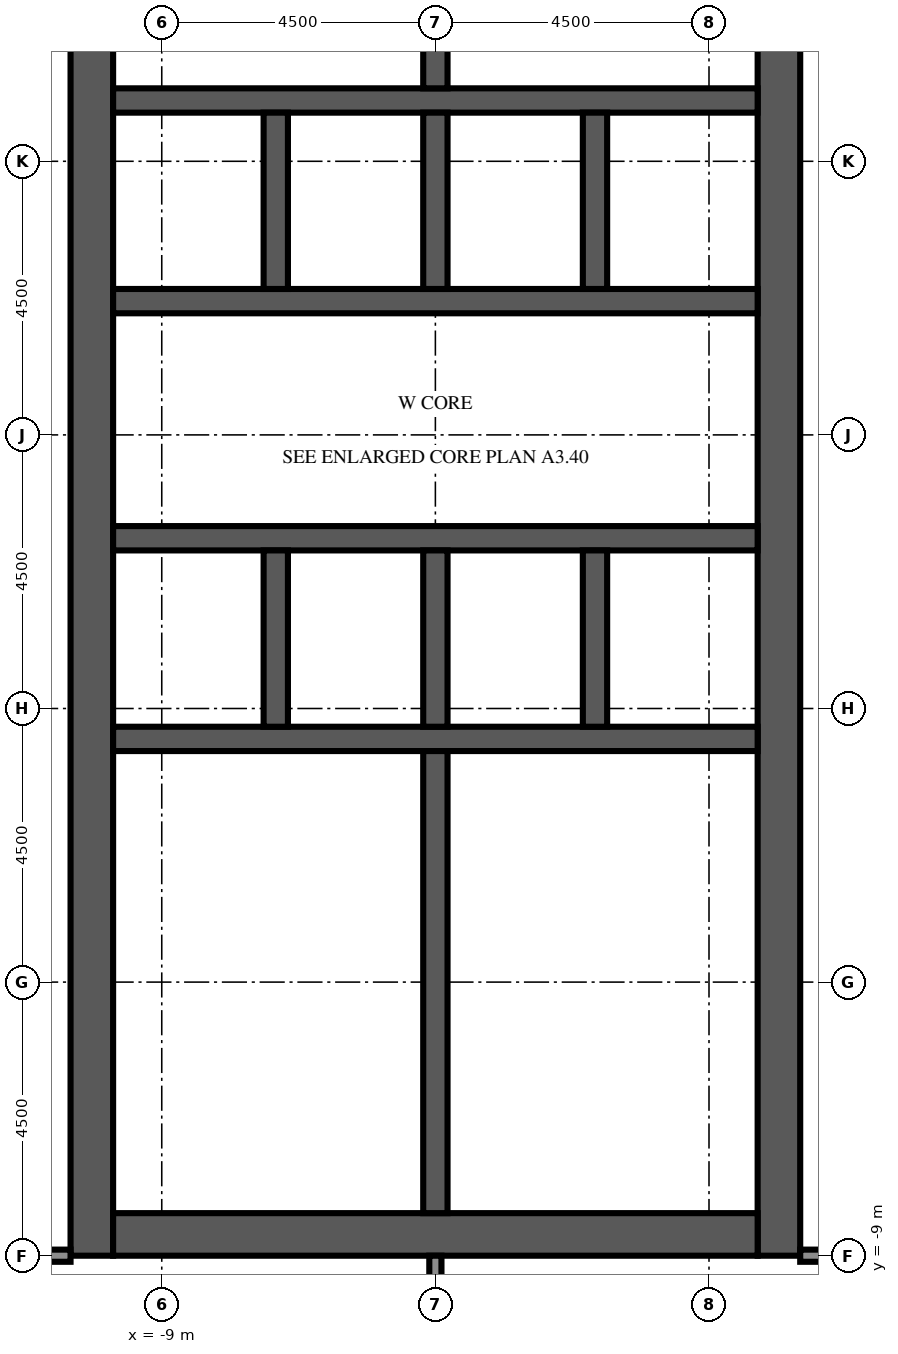
"""IFC4 building model, lengths in metres.
Left out: names, types, materials, properties, quantities, classifications, styles, units other than length and angle.
Written with IfcOpenShell. Run it as: python <this file> out.ifc"""

import sys

from ifc_helpers import new_model, si_unit, direction, frame, frame_2d, origin, place, context, subcontext, project, spatial, rectangle, extrude, element, fill, save


model = new_model("IFC4")
c1 = context("Model", 3, precision=1e-05, world=origin(), true_north=direction((0.0, 1.0)))
c2 = subcontext(c1, "Body", "Model", "MODEL_VIEW")
j1 = project(units=[si_unit("LENGTHUNIT", "METRE"), si_unit("PLANEANGLEUNIT", "RADIAN")], contexts=[c1])
p1 = place(None, origin())
s1 = spatial("IfcSite", under=j1, at=p1, CompositionType="ELEMENT")
p2 = place(p1, origin())
s2 = spatial("IfcBuilding", under=s1, at=p2, CompositionType="ELEMENT")
p3 = place(p2, frame((0.0, 0.0, 274.5)))
s3 = spatial("IfcBuildingStorey", under=s2, at=p3, CompositionType="ELEMENT", Elevation=274.5)
p4 = place(p3, frame((-10.15, -9.0, 0.0), z_axis=(0.0, 0.0, 1.0), x_axis=(0.0, 1.0, 0.0)))
e1 = element("IfcWall", 1, at=p4, inside=s3, PredefinedType="SHEAR", context=c2, shape_type="SweptSolid", body=[
    extrude(rectangle(XDim=27.5, YDim=0.7, at=frame_2d((13.75, 0.0))), origin(), (0.0, 0.0, 1.0), 4.1),
])
p5 = place(p4, frame((12.55, 0.0, 0.0)))
e2 = element("IfcOpeningElement", 2, at=p5, cuts=e1, PredefinedType="OPENING", context=c2, shape_type="SweptSolid", body=[
    extrude(rectangle(XDim=2.4, YDim=2.4, at=frame_2d((1.2, 1.2))), frame((0.0, 0.36, 0.0), z_axis=(0.0, -1.0, 0.0), x_axis=(1.0, 0.0, 0.0)), (0.0, 0.0, 1.0), 0.72),
])
p6 = place(p4, frame((6.825, 0.0, 0.0)))
e3 = element("IfcOpeningElement", 3, at=p6, cuts=e1, PredefinedType="OPENING", context=c2, shape_type="SweptSolid", body=[
    extrude(rectangle(XDim=1.2, YDim=2.1, at=frame_2d((0.6, 1.05))), frame((0.0, 0.36, 0.0), z_axis=(0.0, -1.0, 0.0), x_axis=(1.0, 0.0, 0.0)), (0.0, 0.0, 1.0), 0.72),
])
p7 = place(p4, frame((19.475, 0.0, 0.0)))
e4 = element("IfcOpeningElement", 4, at=p7, cuts=e1, PredefinedType="OPENING", context=c2, shape_type="SweptSolid", body=[
    extrude(rectangle(XDim=1.2, YDim=2.1, at=frame_2d((0.6, 1.05))), frame((0.0, 0.36, 0.0), z_axis=(0.0, -1.0, 0.0), x_axis=(1.0, 0.0, 0.0)), (0.0, 0.0, 1.0), 0.72),
])
p8 = place(p3, frame((1.15, -9.0, 0.0), z_axis=(0.0, 0.0, 1.0), x_axis=(0.0, 1.0, 0.0)))
e5 = element("IfcWall", 5, at=p8, inside=s3, PredefinedType="SHEAR", context=c2, shape_type="SweptSolid", body=[
    extrude(rectangle(XDim=27.5, YDim=0.7, at=frame_2d((13.75, 0.0))), origin(), (0.0, 0.0, 1.0), 4.1),
])
p9 = place(p8, frame((12.55, 0.0, 0.0)))
e6 = element("IfcOpeningElement", 6, at=p9, cuts=e5, PredefinedType="OPENING", context=c2, shape_type="SweptSolid", body=[
    extrude(rectangle(XDim=2.4, YDim=2.4, at=frame_2d((1.2, 1.2))), frame((0.0, 0.36, 0.0), z_axis=(0.0, -1.0, 0.0), x_axis=(1.0, 0.0, 0.0)), (0.0, 0.0, 1.0), 0.72),
])
p10 = place(p8, frame((3.9, 0.0, 0.0)))
e7 = element("IfcOpeningElement", 7, at=p10, cuts=e5, PredefinedType="OPENING", context=c2, shape_type="SweptSolid", body=[
    extrude(rectangle(XDim=1.2, YDim=2.1, at=frame_2d((0.6, 1.05))), frame((0.0, 0.36, 0.0), z_axis=(0.0, -1.0, 0.0), x_axis=(1.0, 0.0, 0.0)), (0.0, 0.0, 1.0), 0.72),
])
p11 = place(p8, frame((19.46, 0.0, 0.0)))
e8 = element("IfcOpeningElement", 8, at=p11, cuts=e5, PredefinedType="OPENING", context=c2, shape_type="SweptSolid", body=[
    extrude(rectangle(XDim=1.0, YDim=2.1, at=frame_2d((0.5, 1.05))), frame((0.0, 0.36, 0.0), z_axis=(0.0, -1.0, 0.0), x_axis=(1.0, 0.0, 0.0)), (0.0, 0.0, 1.0), 0.72),
])
p12 = place(p8, frame((21.17, 0.0, 0.0)))
e9 = element("IfcOpeningElement", 9, at=p12, cuts=e5, PredefinedType="OPENING", context=c2, shape_type="SweptSolid", body=[
    extrude(rectangle(XDim=1.0, YDim=2.1, at=frame_2d((0.5, 1.05))), frame((0.0, 0.36, 0.0), z_axis=(0.0, -1.0, 0.0), x_axis=(1.0, 0.0, 0.0)), (0.0, 0.0, 1.0), 0.72),
])
p13 = place(p8, frame((23.26, 0.0, 0.0)))
e10 = element("IfcOpeningElement", 10, at=p13, cuts=e5, PredefinedType="OPENING", context=c2, shape_type="SweptSolid", body=[
    extrude(rectangle(XDim=1.0, YDim=2.1, at=frame_2d((0.5, 1.05))), frame((0.0, 0.36, 0.0), z_axis=(0.0, -1.0, 0.0), x_axis=(1.0, 0.0, 0.0)), (0.0, 0.0, 1.0), 0.72),
])
p14 = place(p8, frame((25.35, 0.0, 0.0)))
e11 = element("IfcOpeningElement", 11, at=p14, cuts=e5, PredefinedType="OPENING", context=c2, shape_type="SweptSolid", body=[
    extrude(rectangle(XDim=1.0, YDim=2.1, at=frame_2d((0.5, 1.05))), frame((0.0, 0.36, 0.0), z_axis=(0.0, -1.0, 0.0), x_axis=(1.0, 0.0, 0.0)), (0.0, 0.0, 1.0), 0.72),
])
p15 = place(p3, frame((-9.8, -8.65, 0.0), z_axis=(0.0, 0.0, 1.0), x_axis=(1.0, 0.0, 0.0)))
e12 = element("IfcWall", 12, at=p15, inside=s3, PredefinedType="SHEAR", context=c2, shape_type="SweptSolid", body=[
    extrude(rectangle(XDim=10.6, YDim=0.7, at=frame_2d((5.3, 0.0))), origin(), (0.0, 0.0, 1.0), 4.1),
])
p16 = place(p3, frame((-9.8, -0.5, 0.0), z_axis=(0.0, 0.0, 1.0), x_axis=(1.0, 0.0, 0.0)))
e13 = element("IfcWall", 13, at=p16, inside=s3, PredefinedType="SHEAR", context=c2, shape_type="SweptSolid", body=[
    extrude(rectangle(XDim=10.6, YDim=0.4, at=frame_2d((5.3, 0.0))), origin(), (0.0, 0.0, 1.0), 4.1),
])
p17 = place(p3, frame((-9.8, 2.8, 0.0), z_axis=(0.0, 0.0, 1.0), x_axis=(1.0, 0.0, 0.0)))
e14 = element("IfcWall", 14, at=p17, inside=s3, PredefinedType="SHEAR", context=c2, shape_type="SweptSolid", body=[
    extrude(rectangle(XDim=10.6, YDim=0.4, at=frame_2d((5.3, 0.0))), origin(), (0.0, 0.0, 1.0), 4.1),
])
p18 = place(p17, frame((0.688, 0.0, 0.0)))
e15 = element("IfcOpeningElement", 15, at=p18, cuts=e14, PredefinedType="OPENING", context=c2, shape_type="SweptSolid", body=[
    extrude(rectangle(XDim=1.1, YDim=2.1, at=frame_2d((0.55, 1.05))), frame((0.0, 0.21, 0.0), z_axis=(0.0, -1.0, 0.0), x_axis=(1.0, 0.0, 0.0)), (0.0, 0.0, 1.0), 0.42),
])
p19 = place(p17, frame((3.438, 0.0, 0.0)))
e16 = element("IfcOpeningElement", 16, at=p19, cuts=e14, PredefinedType="OPENING", context=c2, shape_type="SweptSolid", body=[
    extrude(rectangle(XDim=1.1, YDim=2.1, at=frame_2d((0.55, 1.05))), frame((0.0, 0.21, 0.0), z_axis=(0.0, -1.0, 0.0), x_axis=(1.0, 0.0, 0.0)), (0.0, 0.0, 1.0), 0.42),
])
p20 = place(p17, frame((6.113, 0.0, 0.0)))
e17 = element("IfcOpeningElement", 17, at=p20, cuts=e14, PredefinedType="OPENING", context=c2, shape_type="SweptSolid", body=[
    extrude(rectangle(XDim=1.0, YDim=2.1, at=frame_2d((0.5, 1.05))), frame((0.0, 0.21, 0.0), z_axis=(0.0, -1.0, 0.0), x_axis=(1.0, 0.0, 0.0)), (0.0, 0.0, 1.0), 0.42),
])
p21 = place(p17, frame((8.863, 0.0, 0.0)))
e18 = element("IfcOpeningElement", 18, at=p21, cuts=e14, PredefinedType="OPENING", context=c2, shape_type="SweptSolid", body=[
    extrude(rectangle(XDim=1.0, YDim=2.1, at=frame_2d((0.5, 1.05))), frame((0.0, 0.21, 0.0), z_axis=(0.0, -1.0, 0.0), x_axis=(1.0, 0.0, 0.0)), (0.0, 0.0, 1.0), 0.42),
])
p22 = place(p3, frame((-9.8, 6.7, 0.0), z_axis=(0.0, 0.0, 1.0), x_axis=(1.0, 0.0, 0.0)))
e19 = element("IfcWall", 19, at=p22, inside=s3, PredefinedType="SHEAR", context=c2, shape_type="SweptSolid", body=[
    extrude(rectangle(XDim=10.6, YDim=0.4, at=frame_2d((5.3, 0.0))), origin(), (0.0, 0.0, 1.0), 4.1),
])
p23 = place(p22, frame((3.438, 0.0, 0.0)))
e20 = element("IfcOpeningElement", 20, at=p23, cuts=e19, PredefinedType="OPENING", context=c2, shape_type="SweptSolid", body=[
    extrude(rectangle(XDim=1.1, YDim=2.1, at=frame_2d((0.55, 1.05))), frame((0.0, 0.21, 0.0), z_axis=(0.0, -1.0, 0.0), x_axis=(1.0, 0.0, 0.0)), (0.0, 0.0, 1.0), 0.42),
])
p24 = place(p22, frame((6.062, 0.0, 0.0)))
e21 = element("IfcOpeningElement", 21, at=p24, cuts=e19, PredefinedType="OPENING", context=c2, shape_type="SweptSolid", body=[
    extrude(rectangle(XDim=1.1, YDim=2.1, at=frame_2d((0.55, 1.05))), frame((0.0, 0.21, 0.0), z_axis=(0.0, -1.0, 0.0), x_axis=(1.0, 0.0, 0.0)), (0.0, 0.0, 1.0), 0.42),
])
p25 = place(p22, frame((8.812, 0.0, 0.0)))
e22 = element("IfcOpeningElement", 22, at=p25, cuts=e19, PredefinedType="OPENING", context=c2, shape_type="SweptSolid", body=[
    extrude(rectangle(XDim=1.1, YDim=2.1, at=frame_2d((0.55, 1.05))), frame((0.0, 0.21, 0.0), z_axis=(0.0, -1.0, 0.0), x_axis=(1.0, 0.0, 0.0)), (0.0, 0.0, 1.0), 0.42),
])
p26 = place(p22, frame((0.738, 0.0, 0.0)))
e23 = element("IfcOpeningElement", 23, at=p26, cuts=e19, PredefinedType="OPENING", context=c2, shape_type="SweptSolid", body=[
    extrude(rectangle(XDim=1.0, YDim=2.1, at=frame_2d((0.5, 1.05))), frame((0.0, 0.21, 0.0), z_axis=(0.0, -1.0, 0.0), x_axis=(1.0, 0.0, 0.0)), (0.0, 0.0, 1.0), 0.42),
])
p27 = place(p3, frame((-9.8, 10.0, 0.0), z_axis=(0.0, 0.0, 1.0), x_axis=(1.0, 0.0, 0.0)))
e24 = element("IfcWall", 24, at=p27, inside=s3, PredefinedType="SHEAR", context=c2, shape_type="SweptSolid", body=[
    extrude(rectangle(XDim=10.6, YDim=0.4, at=frame_2d((5.3, 0.0))), origin(), (0.0, 0.0, 1.0), 4.1),
])
for number, where, z_axis, x_axis in (
    (25, (-7.125, -0.3, 0.0), (0.0, 0.0, 1.0), (0.0, 1.0, 0.0)),
    (26, (-7.125, 6.9, 0.0), (0.0, 0.0, 1.0), (0.0, 1.0, 0.0)),
    (27, (-4.5, -0.3, 0.0), (0.0, 0.0, 1.0), (0.0, 1.0, 0.0)),
    (28, (-4.5, 6.9, 0.0), (0.0, 0.0, 1.0), (0.0, 1.0, 0.0)),
    (29, (-1.875, -0.3, 0.0), (0.0, 0.0, 1.0), (0.0, 1.0, 0.0)),
    (30, (-1.875, 6.9, 0.0), (0.0, 0.0, 1.0), (0.0, 1.0, 0.0)),
):
    element("IfcWall", number, at=place(p3, frame(where, z_axis=z_axis, x_axis=x_axis)), inside=s3, PredefinedType="SHEAR", context=c2, shape_type="SweptSolid", body=[
        extrude(rectangle(XDim=2.9, YDim=0.4, at=frame_2d((1.45, 0.0))), origin(), (0.0, 0.0, 1.0), 4.1),
    ])
for number, where, z_axis, x_axis in (
    (31, (-4.5, -8.3, 0.0), (0.0, 0.0, 1.0), (0.0, 1.0, 0.0)),
    (32, (-4.5, 10.2, 0.0), (0.0, 0.0, 1.0), (0.0, 1.0, 0.0)),
):
    element("IfcWall", number, at=place(p3, frame(where, z_axis=z_axis, x_axis=x_axis)), inside=s3, PredefinedType="SHEAR", context=c2, shape_type="SweptSolid", body=[
        extrude(rectangle(XDim=7.6, YDim=0.4, at=frame_2d((3.8, 0.0))), origin(), (0.0, 0.0, 1.0), 4.1),
    ])
p28 = place(p3, frame((-0.8, -6.02, 0.0), z_axis=(0.0, 0.0, 1.0), x_axis=(1.0, 0.0, 0.0)))
e33 = element("IfcWall", 33, at=p28, inside=s3, PredefinedType="PARTITIONING", context=c2, shape_type="SweptSolid", body=[
    extrude(rectangle(XDim=1.6, YDim=0.1, at=frame_2d((0.8, 0.0))), origin(), (0.0, 0.0, 1.0), 3.65),
])
p29 = place(p28, frame((0.3, 0.0, 0.0)))
e34 = element("IfcOpeningElement", 34, at=p29, cuts=e33, PredefinedType="OPENING", context=c2, shape_type="SweptSolid", body=[
    extrude(rectangle(XDim=1.0, YDim=2.1, at=frame_2d((0.5, 1.05))), frame((0.0, 0.06, 0.0), z_axis=(0.0, -1.0, 0.0), x_axis=(1.0, 0.0, 0.0)), (0.0, 0.0, 1.0), 0.12),
])
p30 = place(p3, frame((-0.8, -2.98, 0.0), z_axis=(0.0, 0.0, 1.0), x_axis=(1.0, 0.0, 0.0)))
e35 = element("IfcWall", 35, at=p30, inside=s3, PredefinedType="PARTITIONING", context=c2, shape_type="SweptSolid", body=[
    extrude(rectangle(XDim=1.6, YDim=0.1, at=frame_2d((0.8, 0.0))), origin(), (0.0, 0.0, 1.0), 3.65),
])
p31 = place(p30, frame((0.3, 0.0, 0.0)))
e36 = element("IfcOpeningElement", 36, at=p31, cuts=e35, PredefinedType="OPENING", context=c2, shape_type="SweptSolid", body=[
    extrude(rectangle(XDim=1.0, YDim=2.1, at=frame_2d((0.5, 1.05))), frame((0.0, 0.06, 0.0), z_axis=(0.0, -1.0, 0.0), x_axis=(1.0, 0.0, 0.0)), (0.0, 0.0, 1.0), 0.12),
])
p32 = place(p3, frame((-0.8, -6.02, 0.0), z_axis=(0.0, 0.0, 1.0), x_axis=(0.0, 1.0, 0.0)))
e37 = element("IfcWall", 37, at=p32, inside=s3, PredefinedType="PARTITIONING", context=c2, shape_type="SweptSolid", body=[
    extrude(rectangle(XDim=3.04, YDim=0.1, at=frame_2d((1.52, 0.0))), origin(), (0.0, 0.0, 1.0), 3.65),
])
p33 = place(p32, frame((1.02, 0.0, 0.0)))
e38 = element("IfcOpeningElement", 38, at=p33, cuts=e37, PredefinedType="OPENING", context=c2, shape_type="SweptSolid", body=[
    extrude(rectangle(XDim=1.0, YDim=2.1, at=frame_2d((0.5, 1.05))), frame((0.0, 0.06, 0.0), z_axis=(0.0, -1.0, 0.0), x_axis=(1.0, 0.0, 0.0)), (0.0, 0.0, 1.0), 0.12),
])
for number, where, z_axis, x_axis in (
    (39, (-4.3, -6.02, 0.0), (0.0, 0.0, 1.0), (1.0, 0.0, 0.0)),
    (40, (-4.3, -2.98, 0.0), (0.0, 0.0, 1.0), (1.0, 0.0, 0.0)),
):
    element("IfcWall", number, at=place(p3, frame(where, z_axis=z_axis, x_axis=x_axis)), inside=s3, PredefinedType="PARTITIONING", context=c2, shape_type="SweptSolid", body=[
        extrude(rectangle(XDim=3.5, YDim=0.1, at=frame_2d((1.75, 0.0))), origin(), (0.0, 0.0, 1.0), 3.65),
    ])
p34 = place(p3, frame((-4.5, -17.6, 0.0), z_axis=(0.0, 0.0, 1.0), x_axis=(0.0, 1.0, 0.0)))
e41 = element("IfcWall", 41, at=p34, inside=s3, PredefinedType="PARTITIONING", context=c2, shape_type="SweptSolid", body=[
    extrude(rectangle(XDim=8.6, YDim=0.2, at=frame_2d((4.3, 0.0))), origin(), (0.0, 0.0, 1.0), 3.65),
])
p35 = place(p3, frame((-10.5, -9.0, 0.0), z_axis=(0.0, 0.0, 1.0), x_axis=(-1.0, 0.0, 0.0)))
e42 = element("IfcWall", 42, at=p35, inside=s3, PredefinedType="PARTITIONING", context=c2, shape_type="SweptSolid", body=[
    extrude(rectangle(XDim=3.0, YDim=0.2, at=frame_2d((1.5, 0.0))), origin(), (0.0, 0.0, 1.0), 3.65),
])
p36 = place(p35, frame((1.15, 0.0, 0.0)))
e43 = element("IfcOpeningElement", 43, at=p36, cuts=e42, PredefinedType="OPENING", context=c2, shape_type="SweptSolid", body=[
    extrude(rectangle(XDim=1.0, YDim=2.1, at=frame_2d((0.5, 1.05))), frame((0.0, 0.11, 0.0), z_axis=(0.0, -1.0, 0.0), x_axis=(1.0, 0.0, 0.0)), (0.0, 0.0, 1.0), 0.22),
])
p37 = place(p3, frame((6.0, -9.0, 0.0), z_axis=(0.0, 0.0, 1.0), x_axis=(-1.0, 0.0, 0.0)))
e44 = element("IfcWall", 44, at=p37, inside=s3, PredefinedType="PARTITIONING", context=c2, shape_type="SweptSolid", body=[
    extrude(rectangle(XDim=4.5, YDim=0.2, at=frame_2d((2.25, 0.0))), origin(), (0.0, 0.0, 1.0), 3.65),
])
p38 = place(p37, frame((2.65, 0.0, 0.0)))
e45 = element("IfcOpeningElement", 45, at=p38, cuts=e44, PredefinedType="OPENING", context=c2, shape_type="SweptSolid", body=[
    extrude(rectangle(XDim=1.0, YDim=2.1, at=frame_2d((0.5, 1.05))), frame((0.0, 0.11, 0.0), z_axis=(0.0, -1.0, 0.0), x_axis=(1.0, 0.0, 0.0)), (0.0, 0.0, 1.0), 0.22),
])
p39 = place(p18, origin())
e46 = element("IfcDoor", 46, at=p39, inside=s3, OperationType="DOUBLE_DOOR_SLIDING", PredefinedType="DOOR", context=c2, shape_type="SweptSolid", body=[
    extrude(rectangle(XDim=1.1, YDim=2.1, at=frame_2d((0.55, 1.05))), frame((0.0, 0.025, 0.0), z_axis=(0.0, -1.0, 0.0), x_axis=(1.0, 0.0, 0.0)), (0.0, 0.0, 1.0), 0.05),
])
fill(e15, e46)
p40 = place(p19, origin())
e47 = element("IfcDoor", 47, at=p40, inside=s3, OperationType="DOUBLE_DOOR_SLIDING", PredefinedType="DOOR", context=c2, shape_type="SweptSolid", body=[
    extrude(rectangle(XDim=1.1, YDim=2.1, at=frame_2d((0.55, 1.05))), frame((0.0, 0.025, 0.0), z_axis=(0.0, -1.0, 0.0), x_axis=(1.0, 0.0, 0.0)), (0.0, 0.0, 1.0), 0.05),
])
fill(e16, e47)
p41 = place(p23, origin())
e48 = element("IfcDoor", 48, at=p41, inside=s3, OperationType="DOUBLE_DOOR_SLIDING", PredefinedType="DOOR", context=c2, shape_type="SweptSolid", body=[
    extrude(rectangle(XDim=1.1, YDim=2.1, at=frame_2d((0.55, 1.05))), frame((0.0, 0.025, 0.0), z_axis=(0.0, -1.0, 0.0), x_axis=(1.0, 0.0, 0.0)), (0.0, 0.0, 1.0), 0.05),
])
fill(e20, e48)
p42 = place(p24, origin())
e49 = element("IfcDoor", 49, at=p42, inside=s3, OperationType="DOUBLE_DOOR_SLIDING", PredefinedType="DOOR", context=c2, shape_type="SweptSolid", body=[
    extrude(rectangle(XDim=1.1, YDim=2.1, at=frame_2d((0.55, 1.05))), frame((0.0, 0.025, 0.0), z_axis=(0.0, -1.0, 0.0), x_axis=(1.0, 0.0, 0.0)), (0.0, 0.0, 1.0), 0.05),
])
fill(e21, e49)
p43 = place(p25, origin())
e50 = element("IfcDoor", 50, at=p43, inside=s3, OperationType="DOUBLE_DOOR_SLIDING", PredefinedType="DOOR", context=c2, shape_type="SweptSolid", body=[
    extrude(rectangle(XDim=1.1, YDim=2.1, at=frame_2d((0.55, 1.05))), frame((0.0, 0.025, 0.0), z_axis=(0.0, -1.0, 0.0), x_axis=(1.0, 0.0, 0.0)), (0.0, 0.0, 1.0), 0.05),
])
fill(e22, e50)
p44 = place(p5, origin())
e51 = element("IfcDoor", 51, at=p44, inside=s3, OperationType="DOUBLE_DOOR_DOUBLE_SWING", PredefinedType="DOOR", context=c2, shape_type="SweptSolid", body=[
    extrude(rectangle(XDim=2.4, YDim=2.4, at=frame_2d((1.2, 1.2))), frame((0.0, 0.025, 0.0), z_axis=(0.0, -1.0, 0.0), x_axis=(1.0, 0.0, 0.0)), (0.0, 0.0, 1.0), 0.05),
])
fill(e2, e51)
p45 = place(p9, origin())
e52 = element("IfcDoor", 52, at=p45, inside=s3, OperationType="DOUBLE_DOOR_DOUBLE_SWING", PredefinedType="DOOR", context=c2, shape_type="SweptSolid", body=[
    extrude(rectangle(XDim=2.4, YDim=2.4, at=frame_2d((1.2, 1.2))), frame((0.0, 0.025, 0.0), z_axis=(0.0, -1.0, 0.0), x_axis=(1.0, 0.0, 0.0)), (0.0, 0.0, 1.0), 0.05),
])
fill(e6, e52)
p46 = place(p6, origin())
e53 = element("IfcDoor", 53, at=p46, inside=s3, OperationType="SINGLE_SWING_LEFT", PredefinedType="DOOR", context=c2, shape_type="SweptSolid", body=[
    extrude(rectangle(XDim=1.2, YDim=2.1, at=frame_2d((0.6, 1.05))), frame((0.0, 0.025, 0.0), z_axis=(0.0, -1.0, 0.0), x_axis=(1.0, 0.0, 0.0)), (0.0, 0.0, 1.0), 0.05),
])
fill(e3, e53)
p47 = place(p7, origin())
e54 = element("IfcDoor", 54, at=p47, inside=s3, OperationType="SINGLE_SWING_LEFT", PredefinedType="DOOR", context=c2, shape_type="SweptSolid", body=[
    extrude(rectangle(XDim=1.2, YDim=2.1, at=frame_2d((0.6, 1.05))), frame((0.0, 0.025, 0.0), z_axis=(0.0, -1.0, 0.0), x_axis=(1.0, 0.0, 0.0)), (0.0, 0.0, 1.0), 0.05),
])
fill(e4, e54)
p48 = place(p20, origin())
e55 = element("IfcDoor", 55, at=p48, inside=s3, OperationType="SINGLE_SWING_LEFT", PredefinedType="DOOR", context=c2, shape_type="SweptSolid", body=[
    extrude(rectangle(XDim=1.0, YDim=2.1, at=frame_2d((0.5, 1.05))), frame((0.0, 0.025, 0.0), z_axis=(0.0, -1.0, 0.0), x_axis=(1.0, 0.0, 0.0)), (0.0, 0.0, 1.0), 0.05),
])
fill(e17, e55)
p49 = place(p21, origin())
e56 = element("IfcDoor", 56, at=p49, inside=s3, OperationType="SINGLE_SWING_RIGHT", PredefinedType="DOOR", context=c2, shape_type="SweptSolid", body=[
    extrude(rectangle(XDim=1.0, YDim=2.1, at=frame_2d((0.5, 1.05))), frame((0.0, 0.025, 0.0), z_axis=(0.0, -1.0, 0.0), x_axis=(1.0, 0.0, 0.0)), (0.0, 0.0, 1.0), 0.05),
])
fill(e18, e56)
p50 = place(p26, origin())
e57 = element("IfcDoor", 57, at=p50, inside=s3, OperationType="SINGLE_SWING_LEFT", PredefinedType="DOOR", context=c2, shape_type="SweptSolid", body=[
    extrude(rectangle(XDim=1.0, YDim=2.1, at=frame_2d((0.5, 1.05))), frame((0.0, 0.025, 0.0), z_axis=(0.0, -1.0, 0.0), x_axis=(1.0, 0.0, 0.0)), (0.0, 0.0, 1.0), 0.05),
])
fill(e23, e57)
p51 = place(p10, origin())
e58 = element("IfcDoor", 58, at=p51, inside=s3, OperationType="SINGLE_SWING_LEFT", PredefinedType="DOOR", context=c2, shape_type="SweptSolid", body=[
    extrude(rectangle(XDim=1.2, YDim=2.1, at=frame_2d((0.6, 1.05))), frame((0.0, 0.325, 0.0), z_axis=(0.0, -1.0, 0.0), x_axis=(1.0, 0.0, 0.0)), (0.0, 0.0, 1.0), 0.05),
])
fill(e7, e58)
p52 = place(p29, origin())
e59 = element("IfcDoor", 59, at=p52, inside=s3, OperationType="SINGLE_SWING_RIGHT", PredefinedType="DOOR", context=c2, shape_type="SweptSolid", body=[
    extrude(rectangle(XDim=1.0, YDim=2.1, at=frame_2d((0.5, 1.05))), frame((0.0, 0.025, 0.0), z_axis=(0.0, -1.0, 0.0), x_axis=(1.0, 0.0, 0.0)), (0.0, 0.0, 1.0), 0.05),
])
fill(e34, e59)
p53 = place(p31, origin())
e60 = element("IfcDoor", 60, at=p53, inside=s3, OperationType="SINGLE_SWING_LEFT", PredefinedType="DOOR", context=c2, shape_type="SweptSolid", body=[
    extrude(rectangle(XDim=1.0, YDim=2.1, at=frame_2d((0.5, 1.05))), frame((0.0, 0.025, 0.0), z_axis=(0.0, -1.0, 0.0), x_axis=(1.0, 0.0, 0.0)), (0.0, 0.0, 1.0), 0.05),
])
fill(e36, e60)
p54 = place(p33, origin())
e61 = element("IfcDoor", 61, at=p54, inside=s3, OperationType="SINGLE_SWING_RIGHT", PredefinedType="DOOR", context=c2, shape_type="SweptSolid", body=[
    extrude(rectangle(XDim=1.0, YDim=2.1, at=frame_2d((0.5, 1.05))), frame((0.0, 0.025, 0.0), z_axis=(0.0, -1.0, 0.0), x_axis=(1.0, 0.0, 0.0)), (0.0, 0.0, 1.0), 0.05),
])
fill(e38, e61)
p55 = place(p11, origin())
e62 = element("IfcDoor", 62, at=p55, inside=s3, OperationType="SINGLE_SWING_LEFT", PredefinedType="DOOR", context=c2, shape_type="SweptSolid", body=[
    extrude(rectangle(XDim=1.0, YDim=2.1, at=frame_2d((0.5, 1.05))), frame((0.0, 0.325, 0.0), z_axis=(0.0, -1.0, 0.0), x_axis=(1.0, 0.0, 0.0)), (0.0, 0.0, 1.0), 0.05),
])
fill(e8, e62)
save(model, sys.argv[1])
